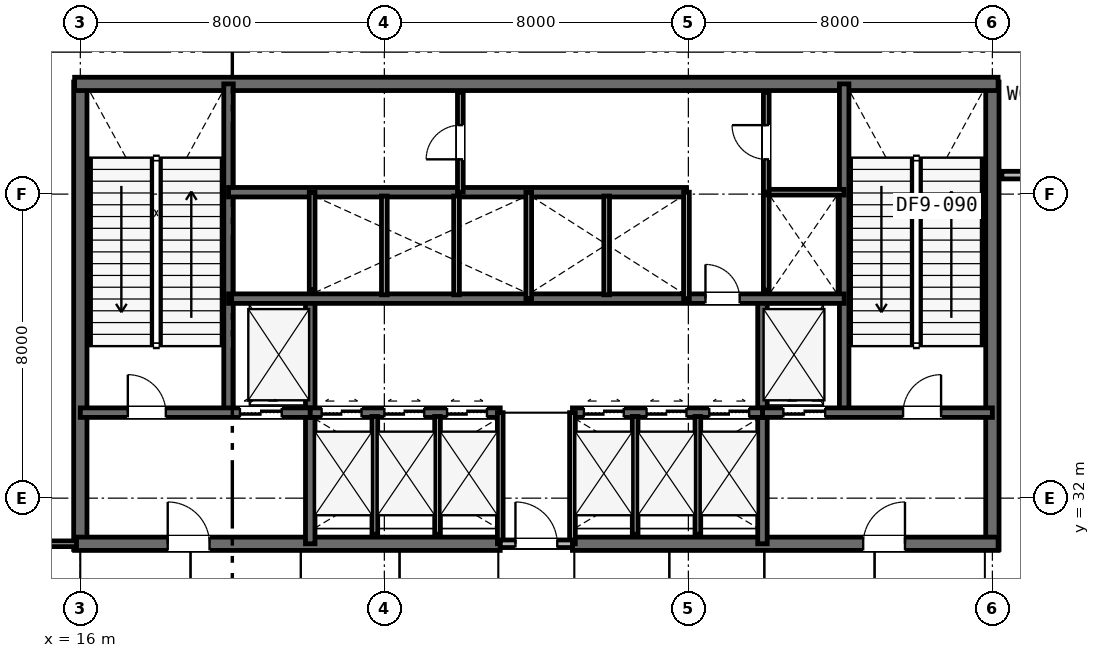
"""IFC4 building model, lengths in metres.
Left out: names, types, materials, properties, quantities, classifications, styles, units other than length and angle.
Written with IfcOpenShell. Run it as: python <this file> out.ifc"""

import sys

from ifc_helpers import new_model, si_unit, direction, frame, frame_2d, origin, place, context, subcontext, project, spatial, rectangle, extrude, element, fill, save


model = new_model("IFC4")
c1 = context("Model", 3, precision=1e-05, world=origin(), true_north=direction((0.0, 1.0)))
c2 = subcontext(c1, "Body", "Model", "MODEL_VIEW")
j1 = project(units=[si_unit("LENGTHUNIT", "METRE"), si_unit("PLANEANGLEUNIT", "RADIAN")], contexts=[c1])
p1 = place(None, origin())
s1 = spatial("IfcSite", under=j1, at=p1, CompositionType="ELEMENT")
p2 = place(p1, origin())
s2 = spatial("IfcBuilding", under=s1, at=p2, CompositionType="ELEMENT")
p3 = place(p2, frame((0.0, 0.0, 84.6)))
s3 = spatial("IfcBuildingStorey", under=s2, at=p3, CompositionType="ELEMENT", Elevation=84.6)
for number, where, z_axis, x_axis in (
    (1, (16.0, 30.65, 0.0), (0.0, 0.0, 1.0), (0.0, 1.0, 0.0)),
    (2, (40.0, 30.65, 0.0), (0.0, 0.0, 1.0), (0.0, 1.0, 0.0)),
):
    element("IfcWall", number, at=place(p3, frame(where, z_axis=z_axis, x_axis=x_axis)), inside=s3, PredefinedType="SHEAR", context=c2, shape_type="SweptSolid", body=[
        extrude(rectangle(XDim=12.3, YDim=0.35, at=frame_2d((6.15, 0.0))), origin(), (0.0, 0.0, 1.0), 5.4),
    ])
p4 = place(p3, frame((15.85, 42.9, 0.0), z_axis=(0.0, 0.0, 1.0), x_axis=(1.0, 0.0, 0.0)))
e3 = element("IfcWall", 3, at=p4, inside=s3, PredefinedType="SHEAR", context=c2, shape_type="SweptSolid", body=[
    extrude(rectangle(XDim=24.3, YDim=0.35, at=frame_2d((12.15, 0.0))), origin(), (0.0, 0.0, 1.0), 5.4),
])
p5 = place(p3, frame((15.85, 30.8, 0.0), z_axis=(0.0, 0.0, 1.0), x_axis=(1.0, 0.0, 0.0)))
e4 = element("IfcWall", 4, at=p5, inside=s3, PredefinedType="SHEAR", context=c2, shape_type="SweptSolid", body=[
    extrude(rectangle(XDim=11.2, YDim=0.35, at=frame_2d((5.6, 0.0))), origin(), (0.0, 0.0, 1.0), 5.4),
])
p6 = place(p5, frame((2.45, 0.0, 0.0)))
e5 = element("IfcOpeningElement", 5, at=p6, cuts=e4, PredefinedType="OPENING", context=c2, shape_type="SweptSolid", body=[
    extrude(rectangle(XDim=1.1, YDim=2.15, at=frame_2d((0.55, 1.075))), frame((0.0, 0.185, 0.0), z_axis=(0.0, -1.0, 0.0), x_axis=(1.0, 0.0, 0.0)), (0.0, 0.0, 1.0), 0.37),
])
p7 = place(p3, frame((28.95, 30.8, 0.0), z_axis=(0.0, 0.0, 1.0), x_axis=(1.0, 0.0, 0.0)))
e6 = element("IfcWall", 6, at=p7, inside=s3, PredefinedType="SHEAR", context=c2, shape_type="SweptSolid", body=[
    extrude(rectangle(XDim=11.2, YDim=0.35, at=frame_2d((5.6, 0.0))), origin(), (0.0, 0.0, 1.0), 5.4),
])
p8 = place(p7, frame((7.65, 0.0, 0.0)))
e7 = element("IfcOpeningElement", 7, at=p8, cuts=e6, PredefinedType="OPENING", context=c2, shape_type="SweptSolid", body=[
    extrude(rectangle(XDim=1.1, YDim=2.15, at=frame_2d((0.55, 1.075))), frame((0.0, 0.185, 0.0), z_axis=(0.0, -1.0, 0.0), x_axis=(1.0, 0.0, 0.0)), (0.0, 0.0, 1.0), 0.37),
])
for number, where, z_axis, x_axis in (
    (8, (19.9, 34.25, 0.0), (0.0, 0.0, 1.0), (0.0, 1.0, 0.0)),
    (9, (36.1, 34.25, 0.0), (0.0, 0.0, 1.0), (0.0, 1.0, 0.0)),
):
    element("IfcWall", number, at=place(p3, frame(where, z_axis=z_axis, x_axis=x_axis)), inside=s3, PredefinedType="SHEAR", context=c2, shape_type="SweptSolid", body=[
        extrude(rectangle(XDim=8.65, YDim=0.25, at=frame_2d((4.325, 0.0))), origin(), (0.0, 0.0, 1.0), 5.4),
    ])
for number, where, z_axis, x_axis in (
    (10, (22.05, 30.8, 0.0), (0.0, 0.0, 1.0), (0.0, 1.0, 0.0)),
    (11, (33.95, 30.8, 0.0), (0.0, 0.0, 1.0), (0.0, 1.0, 0.0)),
):
    element("IfcWall", number, at=place(p3, frame(where, z_axis=z_axis, x_axis=x_axis)), inside=s3, PredefinedType="SHEAR", context=c2, shape_type="SweptSolid", body=[
        extrude(rectangle(XDim=6.45, YDim=0.25, at=frame_2d((3.225, 0.0))), origin(), (0.0, 0.0, 1.0), 5.4),
    ])
p9 = place(p3, frame((16.0, 34.25, 0.0), z_axis=(0.0, 0.0, 1.0), x_axis=(1.0, 0.0, 0.0)))
e12 = element("IfcWall", 12, at=p9, inside=s3, PredefinedType="SHEAR", context=c2, shape_type="SweptSolid", body=[
    extrude(rectangle(XDim=6.05, YDim=0.25, at=frame_2d((3.025, 0.0))), origin(), (0.0, 0.0, 1.0), 5.4),
])
p10 = place(p9, frame((1.25, 0.0, 0.0)))
e13 = element("IfcOpeningElement", 13, at=p10, cuts=e12, PredefinedType="OPENING", context=c2, shape_type="SweptSolid", body=[
    extrude(rectangle(XDim=1.0, YDim=2.15, at=frame_2d((0.5, 1.075))), frame((0.0, 0.135, 0.0), z_axis=(0.0, -1.0, 0.0), x_axis=(1.0, 0.0, 0.0)), (0.0, 0.0, 1.0), 0.27),
])
p11 = place(p9, frame((4.2, 0.0, 0.0)))
e14 = element("IfcOpeningElement", 14, at=p11, cuts=e12, PredefinedType="OPENING", context=c2, shape_type="SweptSolid", body=[
    extrude(rectangle(XDim=1.1, YDim=2.15, at=frame_2d((0.55, 1.075))), frame((0.0, 0.135, 0.0), z_axis=(0.0, -1.0, 0.0), x_axis=(1.0, 0.0, 0.0)), (0.0, 0.0, 1.0), 0.27),
])
p12 = place(p3, frame((33.95, 34.25, 0.0), z_axis=(0.0, 0.0, 1.0), x_axis=(1.0, 0.0, 0.0)))
e15 = element("IfcWall", 15, at=p12, inside=s3, PredefinedType="SHEAR", context=c2, shape_type="SweptSolid", body=[
    extrude(rectangle(XDim=6.05, YDim=0.25, at=frame_2d((3.025, 0.0))), origin(), (0.0, 0.0, 1.0), 5.4),
])
p13 = place(p12, frame((3.7, 0.0, 0.0)))
e16 = element("IfcOpeningElement", 16, at=p13, cuts=e15, PredefinedType="OPENING", context=c2, shape_type="SweptSolid", body=[
    extrude(rectangle(XDim=1.0, YDim=2.15, at=frame_2d((0.5, 1.075))), frame((0.0, 0.135, 0.0), z_axis=(0.0, -1.0, 0.0), x_axis=(1.0, 0.0, 0.0)), (0.0, 0.0, 1.0), 0.27),
])
p14 = place(p12, frame((0.55, 0.0, 0.0)))
e17 = element("IfcOpeningElement", 17, at=p14, cuts=e15, PredefinedType="OPENING", context=c2, shape_type="SweptSolid", body=[
    extrude(rectangle(XDim=1.1, YDim=2.15, at=frame_2d((0.55, 1.075))), frame((0.0, 0.135, 0.0), z_axis=(0.0, -1.0, 0.0), x_axis=(1.0, 0.0, 0.0)), (0.0, 0.0, 1.0), 0.27),
])
p15 = place(p3, frame((22.05, 34.25, 0.0), z_axis=(0.0, 0.0, 1.0), x_axis=(1.0, 0.0, 0.0)))
e18 = element("IfcWall", 18, at=p15, inside=s3, PredefinedType="SHEAR", context=c2, shape_type="SweptSolid", body=[
    extrude(rectangle(XDim=5.0, YDim=0.25, at=frame_2d((2.5, 0.0))), origin(), (0.0, 0.0, 1.0), 5.4),
])
p16 = place(p15, frame((0.3, 0.0, 0.0)))
e19 = element("IfcOpeningElement", 19, at=p16, cuts=e18, PredefinedType="OPENING", context=c2, shape_type="SweptSolid", body=[
    extrude(rectangle(XDim=1.05, YDim=2.15, at=frame_2d((0.525, 1.075))), frame((0.0, 0.135, 0.0), z_axis=(0.0, -1.0, 0.0), x_axis=(1.0, 0.0, 0.0)), (0.0, 0.0, 1.0), 0.27),
])
p17 = place(p15, frame((1.95, 0.0, 0.0)))
e20 = element("IfcOpeningElement", 20, at=p17, cuts=e18, PredefinedType="OPENING", context=c2, shape_type="SweptSolid", body=[
    extrude(rectangle(XDim=1.05, YDim=2.15, at=frame_2d((0.525, 1.075))), frame((0.0, 0.135, 0.0), z_axis=(0.0, -1.0, 0.0), x_axis=(1.0, 0.0, 0.0)), (0.0, 0.0, 1.0), 0.27),
])
p18 = place(p15, frame((3.6, 0.0, 0.0)))
e21 = element("IfcOpeningElement", 21, at=p18, cuts=e18, PredefinedType="OPENING", context=c2, shape_type="SweptSolid", body=[
    extrude(rectangle(XDim=1.05, YDim=2.15, at=frame_2d((0.525, 1.075))), frame((0.0, 0.135, 0.0), z_axis=(0.0, -1.0, 0.0), x_axis=(1.0, 0.0, 0.0)), (0.0, 0.0, 1.0), 0.27),
])
p19 = place(p3, frame((28.95, 34.25, 0.0), z_axis=(0.0, 0.0, 1.0), x_axis=(1.0, 0.0, 0.0)))
e22 = element("IfcWall", 22, at=p19, inside=s3, PredefinedType="SHEAR", context=c2, shape_type="SweptSolid", body=[
    extrude(rectangle(XDim=5.0, YDim=0.25, at=frame_2d((2.5, 0.0))), origin(), (0.0, 0.0, 1.0), 5.4),
])
p20 = place(p19, frame((0.3, 0.0, 0.0)))
e23 = element("IfcOpeningElement", 23, at=p20, cuts=e22, PredefinedType="OPENING", context=c2, shape_type="SweptSolid", body=[
    extrude(rectangle(XDim=1.05, YDim=2.15, at=frame_2d((0.525, 1.075))), frame((0.0, 0.135, 0.0), z_axis=(0.0, -1.0, 0.0), x_axis=(1.0, 0.0, 0.0)), (0.0, 0.0, 1.0), 0.27),
])
p21 = place(p19, frame((1.95, 0.0, 0.0)))
e24 = element("IfcOpeningElement", 24, at=p21, cuts=e22, PredefinedType="OPENING", context=c2, shape_type="SweptSolid", body=[
    extrude(rectangle(XDim=1.05, YDim=2.15, at=frame_2d((0.525, 1.075))), frame((0.0, 0.135, 0.0), z_axis=(0.0, -1.0, 0.0), x_axis=(1.0, 0.0, 0.0)), (0.0, 0.0, 1.0), 0.27),
])
p22 = place(p19, frame((3.6, 0.0, 0.0)))
e25 = element("IfcOpeningElement", 25, at=p22, cuts=e22, PredefinedType="OPENING", context=c2, shape_type="SweptSolid", body=[
    extrude(rectangle(XDim=1.05, YDim=2.15, at=frame_2d((0.525, 1.075))), frame((0.0, 0.135, 0.0), z_axis=(0.0, -1.0, 0.0), x_axis=(1.0, 0.0, 0.0)), (0.0, 0.0, 1.0), 0.27),
])
p23 = place(p3, frame((19.9, 37.25, 0.0), z_axis=(0.0, 0.0, 1.0), x_axis=(1.0, 0.0, 0.0)))
e26 = element("IfcWall", 26, at=p23, inside=s3, PredefinedType="SHEAR", context=c2, shape_type="SweptSolid", body=[
    extrude(rectangle(XDim=16.2, YDim=0.25, at=frame_2d((8.1, 0.0))), origin(), (0.0, 0.0, 1.0), 5.4),
])
p24 = place(p23, frame((12.55, 0.0, 0.0)))
e27 = element("IfcOpeningElement", 27, at=p24, cuts=e26, PredefinedType="OPENING", context=c2, shape_type="SweptSolid", body=[
    extrude(rectangle(XDim=0.9, YDim=2.15, at=frame_2d((0.45, 1.075))), frame((0.0, 0.135, 0.0), z_axis=(0.0, -1.0, 0.0), x_axis=(1.0, 0.0, 0.0)), (0.0, 0.0, 1.0), 0.27),
])
p25 = place(p3, frame((19.9, 40.05, 0.0), z_axis=(0.0, 0.0, 1.0), x_axis=(1.0, 0.0, 0.0)))
e28 = element("IfcWall", 28, at=p25, inside=s3, PredefinedType="SHEAR", context=c2, shape_type="SweptSolid", body=[
    extrude(rectangle(XDim=12.05, YDim=0.25, at=frame_2d((6.025, 0.0))), origin(), (0.0, 0.0, 1.0), 5.4),
])
for number, where, z_axis, x_axis in (
    (29, (27.05, 30.8, 0.0), (0.0, 0.0, 1.0), (0.0, 1.0, 0.0)),
    (30, (28.95, 30.8, 0.0), (0.0, 0.0, 1.0), (0.0, 1.0, 0.0)),
):
    element("IfcWall", number, at=place(p3, frame(where, z_axis=z_axis, x_axis=x_axis)), inside=s3, PredefinedType="PLUMBINGWALL", context=c2, shape_type="SweptSolid", body=[
        extrude(rectangle(XDim=3.45, YDim=0.15, at=frame_2d((1.725, 0.0))), origin(), (0.0, 0.0, 1.0), 5.13),
    ])
p26 = place(p3, frame((27.05, 30.8, 0.0), z_axis=(0.0, 0.0, 1.0), x_axis=(1.0, 0.0, 0.0)))
e31 = element("IfcWall", 31, at=p26, inside=s3, PredefinedType="PARTITIONING", context=c2, shape_type="SweptSolid", body=[
    extrude(rectangle(XDim=1.9, YDim=0.2, at=frame_2d((0.95, 0.0))), origin(), (0.0, 0.0, 1.0), 5.13),
])
p27 = place(p26, frame((0.4, 0.0, 0.0)))
e32 = element("IfcOpeningElement", 32, at=p27, cuts=e31, PredefinedType="OPENING", context=c2, shape_type="SweptSolid", body=[
    extrude(rectangle(XDim=1.1, YDim=2.15, at=frame_2d((0.55, 1.075))), frame((0.0, 0.11, 0.0), z_axis=(0.0, -1.0, 0.0), x_axis=(1.0, 0.0, 0.0)), (0.0, 0.0, 1.0), 0.22),
])
for number, where, z_axis, x_axis in (
    (33, (23.75, 31.05, 0.0), (0.0, 0.0, 1.0), (0.0, 1.0, 0.0)),
    (34, (25.4, 31.05, 0.0), (0.0, 0.0, 1.0), (0.0, 1.0, 0.0)),
    (35, (30.6, 31.05, 0.0), (0.0, 0.0, 1.0), (0.0, 1.0, 0.0)),
    (36, (32.25, 31.05, 0.0), (0.0, 0.0, 1.0), (0.0, 1.0, 0.0)),
):
    element("IfcWall", number, at=place(p3, frame(where, z_axis=z_axis, x_axis=x_axis)), inside=s3, PredefinedType="PLUMBINGWALL", context=c2, shape_type="SweptSolid", body=[
        extrude(rectangle(XDim=3.1, YDim=0.15, at=frame_2d((1.55, 0.0))), origin(), (0.0, 0.0, 1.0), 5.13),
    ])
p28 = place(p3, frame((22.1, 37.49, 0.0), z_axis=(0.0, 0.0, 1.0), x_axis=(0.0, 1.0, 0.0)))
e37 = element("IfcWall", 37, at=p28, inside=s3, PredefinedType="PLUMBINGWALL", context=c2, shape_type="SweptSolid", body=[
    extrude(rectangle(XDim=2.56, YDim=0.15, at=frame_2d((1.28, 0.0))), origin(), (0.0, 0.0, 1.0), 5.13),
])
p29 = place(p3, frame((27.8, 37.25, 0.0), z_axis=(0.0, 0.0, 1.0), x_axis=(0.0, 1.0, 0.0)))
e38 = element("IfcWall", 38, at=p29, inside=s3, PredefinedType="PLUMBINGWALL", context=c2, shape_type="SweptSolid", body=[
    extrude(rectangle(XDim=2.8, YDim=0.15, at=frame_2d((1.4, 0.0))), origin(), (0.0, 0.0, 1.0), 5.13),
])
for number, where, z_axis, x_axis in (
    (39, (24.0, 37.35, 0.0), (0.0, 0.0, 1.0), (0.0, 1.0, 0.0)),
    (40, (25.9, 37.35, 0.0), (0.0, 0.0, 1.0), (0.0, 1.0, 0.0)),
):
    element("IfcWall", number, at=place(p3, frame(where, z_axis=z_axis, x_axis=x_axis)), inside=s3, PredefinedType="PLUMBINGWALL", context=c2, shape_type="SweptSolid", body=[
        extrude(rectangle(XDim=2.6, YDim=0.15, at=frame_2d((1.3, 0.0))), origin(), (0.0, 0.0, 1.0), 5.13),
    ])
p30 = place(p3, frame((31.95, 37.25, 0.0), z_axis=(0.0, 0.0, 1.0), x_axis=(0.0, 1.0, 0.0)))
e41 = element("IfcWall", 41, at=p30, inside=s3, PredefinedType="PLUMBINGWALL", context=c2, shape_type="SweptSolid", body=[
    extrude(rectangle(XDim=2.8, YDim=0.15, at=frame_2d((1.4, 0.0))), origin(), (0.0, 0.0, 1.0), 5.13),
])
p31 = place(p3, frame((29.85, 37.35, 0.0), z_axis=(0.0, 0.0, 1.0), x_axis=(0.0, 1.0, 0.0)))
e42 = element("IfcWall", 42, at=p31, inside=s3, PredefinedType="PLUMBINGWALL", context=c2, shape_type="SweptSolid", body=[
    extrude(rectangle(XDim=2.6, YDim=0.15, at=frame_2d((1.3, 0.0))), origin(), (0.0, 0.0, 1.0), 5.13),
])
p32 = place(p3, frame((34.05, 37.473, 0.0), z_axis=(0.0, 0.0, 1.0), x_axis=(0.0, 1.0, 0.0)))
e43 = element("IfcWall", 43, at=p32, inside=s3, PredefinedType="PLUMBINGWALL", context=c2, shape_type="SweptSolid", body=[
    extrude(rectangle(XDim=2.577, YDim=0.15, at=frame_2d((1.288, 0.0))), origin(), (0.0, 0.0, 1.0), 5.13),
])
p33 = place(p3, frame((34.05, 40.05, 0.0), z_axis=(0.0, 0.0, 1.0), x_axis=(1.0, 0.0, 0.0)))
e44 = element("IfcWall", 44, at=p33, inside=s3, PredefinedType="PARTITIONING", context=c2, shape_type="SweptSolid", body=[
    extrude(rectangle(XDim=2.05, YDim=0.15, at=frame_2d((1.025, 0.0))), origin(), (0.0, 0.0, 1.0), 5.13),
])
p34 = place(p3, frame((34.05, 40.05, 0.0), z_axis=(0.0, 0.0, 1.0), x_axis=(0.0, 1.0, 0.0)))
e45 = element("IfcWall", 45, at=p34, inside=s3, PredefinedType="PARTITIONING", context=c2, shape_type="SweptSolid", body=[
    extrude(rectangle(XDim=2.63, YDim=0.15, at=frame_2d((1.315, 0.0))), origin(), (0.0, 0.0, 1.0), 5.13),
])
p35 = place(p34, frame((0.865, 0.0, 0.0)))
e46 = element("IfcOpeningElement", 46, at=p35, cuts=e45, PredefinedType="OPENING", context=c2, shape_type="SweptSolid", body=[
    extrude(rectangle(XDim=0.9, YDim=2.15, at=frame_2d((0.45, 1.075))), frame((0.0, 0.085, 0.0), z_axis=(0.0, -1.0, 0.0), x_axis=(1.0, 0.0, 0.0)), (0.0, 0.0, 1.0), 0.17),
])
p36 = place(p3, frame((26.0, 40.05, 0.0), z_axis=(0.0, 0.0, 1.0), x_axis=(0.0, 1.0, 0.0)))
e47 = element("IfcWall", 47, at=p36, inside=s3, PredefinedType="PARTITIONING", context=c2, shape_type="SweptSolid", body=[
    extrude(rectangle(XDim=2.63, YDim=0.15, at=frame_2d((1.315, 0.0))), origin(), (0.0, 0.0, 1.0), 5.13),
])
p37 = place(p36, frame((0.865, 0.0, 0.0)))
e48 = element("IfcOpeningElement", 48, at=p37, cuts=e47, PredefinedType="OPENING", context=c2, shape_type="SweptSolid", body=[
    extrude(rectangle(XDim=0.9, YDim=2.15, at=frame_2d((0.45, 1.075))), frame((0.0, 0.085, 0.0), z_axis=(0.0, -1.0, 0.0), x_axis=(1.0, 0.0, 0.0)), (0.0, 0.0, 1.0), 0.17),
])
p38 = place(p3, frame((40.25, 40.5, 0.0), z_axis=(0.0, 0.0, 1.0), x_axis=(1.0, 0.0, 0.0)))
e49 = element("IfcWall", 49, at=p38, inside=s3, PredefinedType="PARTITIONING", context=c2, shape_type="SweptSolid", body=[
    extrude(rectangle(XDim=2.1, YDim=0.2, at=frame_2d((1.05, 0.0))), origin(), (0.0, 0.0, 1.0), 5.13),
])
p39 = place(p38, frame((0.6, 0.0, 0.0)))
e50 = element("IfcOpeningElement", 50, at=p39, cuts=e49, PredefinedType="OPENING", context=c2, shape_type="SweptSolid", body=[
    extrude(rectangle(XDim=0.9, YDim=2.15, at=frame_2d((0.45, 1.075))), frame((0.0, 0.11, 0.0), z_axis=(0.0, -1.0, 0.0), x_axis=(1.0, 0.0, 0.0)), (0.0, 0.0, 1.0), 0.22),
])
p40 = place(p3, frame((0.1, 30.8, 0.0), z_axis=(0.0, 0.0, 1.0), x_axis=(1.0, 0.0, 0.0)))
e51 = element("IfcWall", 51, at=p40, inside=s3, PredefinedType="PARTITIONING", context=c2, shape_type="SweptSolid", body=[
    extrude(rectangle(XDim=15.8, YDim=0.15, at=frame_2d((7.9, 0.0))), origin(), (0.0, 0.0, 1.0), 4.63),
])
p41 = place(p40, frame((9.686, 0.0, 0.0)))
e52 = element("IfcOpeningElement", 52, at=p41, cuts=e51, PredefinedType="OPENING", context=c2, shape_type="SweptSolid", body=[
    extrude(rectangle(XDim=0.95, YDim=2.15, at=frame_2d((0.475, 1.075))), frame((0.0, 0.085, 0.0), z_axis=(0.0, -1.0, 0.0), x_axis=(1.0, 0.0, 0.0)), (0.0, 0.0, 1.0), 0.17),
])
p42 = place(p27, origin())
e53 = element("IfcDoor", 53, at=p42, inside=s3, OperationType="SINGLE_SWING_LEFT", PredefinedType="DOOR", context=c2, shape_type="SweptSolid", body=[
    extrude(rectangle(XDim=1.1, YDim=2.15, at=frame_2d((0.55, 1.075))), frame((0.0, 0.025, 0.0), z_axis=(0.0, -1.0, 0.0), x_axis=(1.0, 0.0, 0.0)), (0.0, 0.0, 1.0), 0.05),
])
fill(e32, e53)
p43 = place(p10, origin())
e54 = element("IfcDoor", 54, at=p43, inside=s3, OperationType="SINGLE_SWING_LEFT", PredefinedType="DOOR", context=c2, shape_type="SweptSolid", body=[
    extrude(rectangle(XDim=1.0, YDim=2.15, at=frame_2d((0.5, 1.075))), frame((0.0, 0.025, 0.0), z_axis=(0.0, -1.0, 0.0), x_axis=(1.0, 0.0, 0.0)), (0.0, 0.0, 1.0), 0.05),
])
fill(e13, e54)
p44 = place(p13, origin())
e55 = element("IfcDoor", 55, at=p44, inside=s3, OperationType="SINGLE_SWING_RIGHT", PredefinedType="DOOR", context=c2, shape_type="SweptSolid", body=[
    extrude(rectangle(XDim=1.0, YDim=2.15, at=frame_2d((0.5, 1.075))), frame((0.0, 0.025, 0.0), z_axis=(0.0, -1.0, 0.0), x_axis=(1.0, 0.0, 0.0)), (0.0, 0.0, 1.0), 0.05),
])
fill(e16, e55)
p45 = place(p6, origin())
e56 = element("IfcDoor", 56, at=p45, inside=s3, OperationType="SINGLE_SWING_LEFT", PredefinedType="DOOR", context=c2, shape_type="SweptSolid", body=[
    extrude(rectangle(XDim=1.1, YDim=2.15, at=frame_2d((0.55, 1.075))), frame((0.0, 0.025, 0.0), z_axis=(0.0, -1.0, 0.0), x_axis=(1.0, 0.0, 0.0)), (0.0, 0.0, 1.0), 0.05),
])
fill(e5, e56)
p46 = place(p8, origin())
e57 = element("IfcDoor", 57, at=p46, inside=s3, OperationType="SINGLE_SWING_RIGHT", PredefinedType="DOOR", context=c2, shape_type="SweptSolid", body=[
    extrude(rectangle(XDim=1.1, YDim=2.15, at=frame_2d((0.55, 1.075))), frame((0.0, 0.025, 0.0), z_axis=(0.0, -1.0, 0.0), x_axis=(1.0, 0.0, 0.0)), (0.0, 0.0, 1.0), 0.05),
])
fill(e7, e57)
p47 = place(p24, origin())
e58 = element("IfcDoor", 58, at=p47, inside=s3, OperationType="SINGLE_SWING_LEFT", PredefinedType="DOOR", context=c2, shape_type="SweptSolid", body=[
    extrude(rectangle(XDim=0.9, YDim=2.15, at=frame_2d((0.45, 1.075))), frame((0.0, 0.025, 0.0), z_axis=(0.0, -1.0, 0.0), x_axis=(1.0, 0.0, 0.0)), (0.0, 0.0, 1.0), 0.05),
])
fill(e27, e58)
p48 = place(p35, origin())
e59 = element("IfcDoor", 59, at=p48, inside=s3, OperationType="SINGLE_SWING_RIGHT", PredefinedType="DOOR", context=c2, shape_type="SweptSolid", body=[
    extrude(rectangle(XDim=0.9, YDim=2.15, at=frame_2d((0.45, 1.075))), frame((0.0, 0.025, 0.0), z_axis=(0.0, -1.0, 0.0), x_axis=(1.0, 0.0, 0.0)), (0.0, 0.0, 1.0), 0.05),
])
fill(e46, e59)
p49 = place(p37, origin())
e60 = element("IfcDoor", 60, at=p49, inside=s3, OperationType="SINGLE_SWING_LEFT", PredefinedType="DOOR", context=c2, shape_type="SweptSolid", body=[
    extrude(rectangle(XDim=0.9, YDim=2.15, at=frame_2d((0.45, 1.075))), frame((0.0, 0.025, 0.0), z_axis=(0.0, -1.0, 0.0), x_axis=(1.0, 0.0, 0.0)), (0.0, 0.0, 1.0), 0.05),
])
fill(e48, e60)
p50 = place(p11, origin())
e61 = element("IfcDoor", 61, at=p50, inside=s3, OperationType="DOUBLE_DOOR_SLIDING", PredefinedType="DOOR", context=c2, shape_type="SweptSolid", body=[
    extrude(rectangle(XDim=1.1, YDim=2.15, at=frame_2d((0.55, 1.075))), frame((0.0, 0.025, 0.0), z_axis=(0.0, -1.0, 0.0), x_axis=(1.0, 0.0, 0.0)), (0.0, 0.0, 1.0), 0.05),
])
fill(e14, e61)
p51 = place(p14, origin())
e62 = element("IfcDoor", 62, at=p51, inside=s3, OperationType="DOUBLE_DOOR_SLIDING", PredefinedType="DOOR", context=c2, shape_type="SweptSolid", body=[
    extrude(rectangle(XDim=1.1, YDim=2.15, at=frame_2d((0.55, 1.075))), frame((0.0, 0.025, 0.0), z_axis=(0.0, -1.0, 0.0), x_axis=(1.0, 0.0, 0.0)), (0.0, 0.0, 1.0), 0.05),
])
fill(e17, e62)
p52 = place(p16, origin())
e63 = element("IfcDoor", 63, at=p52, inside=s3, OperationType="DOUBLE_DOOR_SLIDING", PredefinedType="DOOR", context=c2, shape_type="SweptSolid", body=[
    extrude(rectangle(XDim=1.05, YDim=2.15, at=frame_2d((0.525, 1.075))), frame((0.0, 0.025, 0.0), z_axis=(0.0, -1.0, 0.0), x_axis=(1.0, 0.0, 0.0)), (0.0, 0.0, 1.0), 0.05),
])
fill(e19, e63)
p53 = place(p17, origin())
e64 = element("IfcDoor", 64, at=p53, inside=s3, OperationType="DOUBLE_DOOR_SLIDING", PredefinedType="DOOR", context=c2, shape_type="SweptSolid", body=[
    extrude(rectangle(XDim=1.05, YDim=2.15, at=frame_2d((0.525, 1.075))), frame((0.0, 0.025, 0.0), z_axis=(0.0, -1.0, 0.0), x_axis=(1.0, 0.0, 0.0)), (0.0, 0.0, 1.0), 0.05),
])
fill(e20, e64)
p54 = place(p18, origin())
e65 = element("IfcDoor", 65, at=p54, inside=s3, OperationType="DOUBLE_DOOR_SLIDING", PredefinedType="DOOR", context=c2, shape_type="SweptSolid", body=[
    extrude(rectangle(XDim=1.05, YDim=2.15, at=frame_2d((0.525, 1.075))), frame((0.0, 0.025, 0.0), z_axis=(0.0, -1.0, 0.0), x_axis=(1.0, 0.0, 0.0)), (0.0, 0.0, 1.0), 0.05),
])
fill(e21, e65)
p55 = place(p20, origin())
e66 = element("IfcDoor", 66, at=p55, inside=s3, OperationType="DOUBLE_DOOR_SLIDING", PredefinedType="DOOR", context=c2, shape_type="SweptSolid", body=[
    extrude(rectangle(XDim=1.05, YDim=2.15, at=frame_2d((0.525, 1.075))), frame((0.0, 0.025, 0.0), z_axis=(0.0, -1.0, 0.0), x_axis=(1.0, 0.0, 0.0)), (0.0, 0.0, 1.0), 0.05),
])
fill(e23, e66)
p56 = place(p21, origin())
e67 = element("IfcDoor", 67, at=p56, inside=s3, OperationType="DOUBLE_DOOR_SLIDING", PredefinedType="DOOR", context=c2, shape_type="SweptSolid", body=[
    extrude(rectangle(XDim=1.05, YDim=2.15, at=frame_2d((0.525, 1.075))), frame((0.0, 0.025, 0.0), z_axis=(0.0, -1.0, 0.0), x_axis=(1.0, 0.0, 0.0)), (0.0, 0.0, 1.0), 0.05),
])
fill(e24, e67)
p57 = place(p22, origin())
e68 = element("IfcDoor", 68, at=p57, inside=s3, OperationType="DOUBLE_DOOR_SLIDING", PredefinedType="DOOR", context=c2, shape_type="SweptSolid", body=[
    extrude(rectangle(XDim=1.05, YDim=2.15, at=frame_2d((0.525, 1.075))), frame((0.0, 0.025, 0.0), z_axis=(0.0, -1.0, 0.0), x_axis=(1.0, 0.0, 0.0)), (0.0, 0.0, 1.0), 0.05),
])
fill(e25, e68)
save(model, sys.argv[1])
